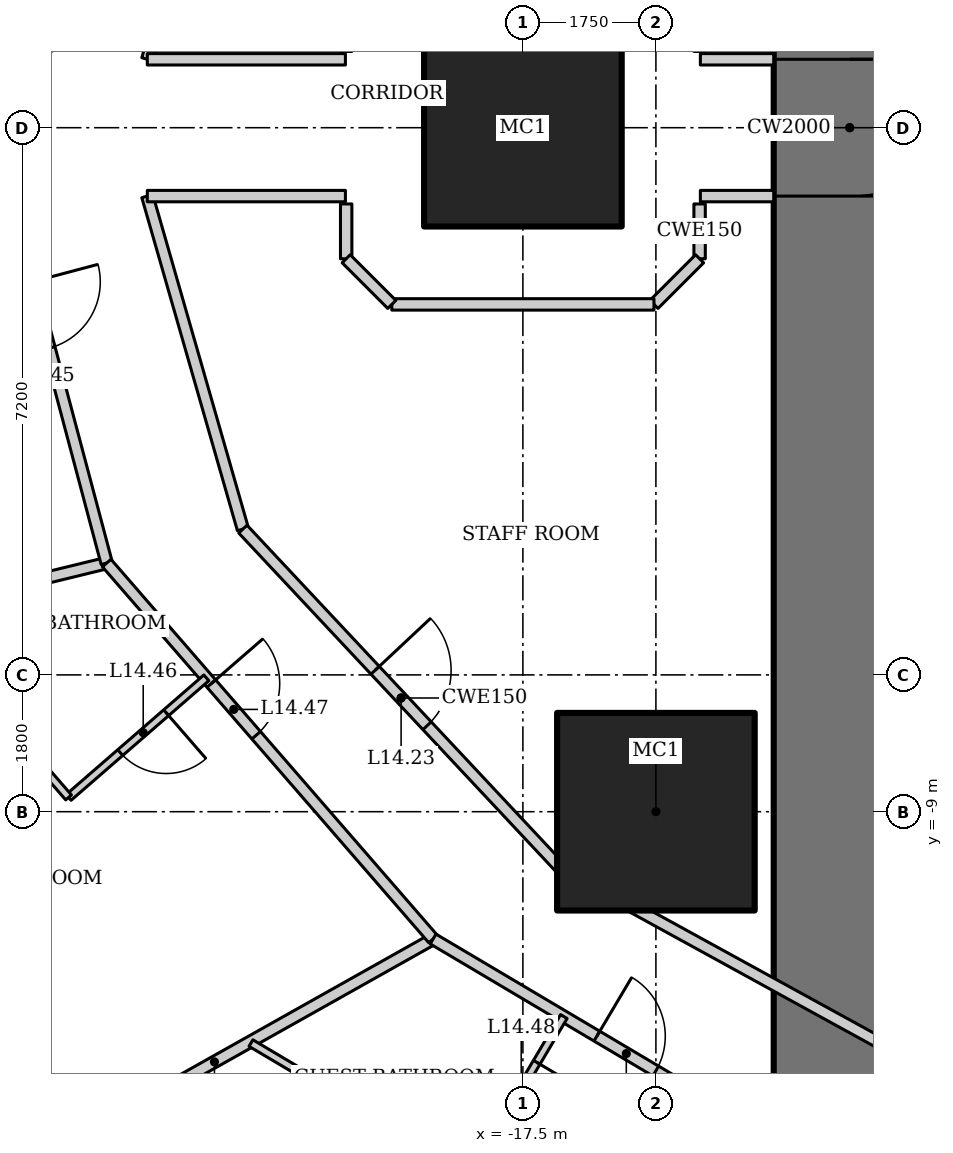
"""IFC4 building model, lengths in metres.
Left out: names, types, materials, properties, quantities, classifications, styles, units other than length and angle.
Written with IfcOpenShell. Run it as: python <this file> out.ifc"""

import sys

from ifc_helpers import new_model, si_unit, direction, frame, frame_2d, origin, origin_2d, place, context, subcontext, project, spatial, rectangle, hollow_rectangle, extrude, element, fill, save


model = new_model("IFC4")
c1 = context("Model", 3, precision=1e-05, world=origin(), true_north=direction((0.0, 1.0)))
c2 = subcontext(c1, "Body", "Model", "MODEL_VIEW")
j1 = project(units=[si_unit("LENGTHUNIT", "METRE"), si_unit("PLANEANGLEUNIT", "RADIAN")], contexts=[c1])
p1 = place(None, origin())
s1 = spatial("IfcSite", under=j1, at=p1, CompositionType="ELEMENT")
p2 = place(p1, origin())
s2 = spatial("IfcBuilding", under=s1, at=p2, CompositionType="ELEMENT")
p3 = place(p2, frame((0.0, 0.0, 65.8)))
s3 = spatial("IfcBuildingStorey", under=s2, at=p3, CompositionType="ELEMENT", Elevation=65.8)
for number, where, z_axis, x_axis in (
    (1, (-17.5, 0.0, 0.0), (0.0, 0.0, 1.0), (1.0, 0.0, 0.0)),
    (2, (-15.75, -9.0, 0.0), (0.0, 0.0, 1.0), (1.0, 0.0, 0.0)),
):
    element("IfcColumn", number, at=place(p3, frame(where, z_axis=z_axis, x_axis=x_axis)), inside=s3, PredefinedType="COLUMN", context=c2, shape_type="SweptSolid", body=[
        extrude(hollow_rectangle(XDim=2.6, YDim=2.6, WallThickness=0.13, at=origin_2d()), origin(), (0.0, 0.0, 1.0), 3.6),
    ])
p4 = place(p3, frame((-13.2, 13.0, 0.0), z_axis=(0.0, 0.0, 1.0), x_axis=(0.0, -1.0, 0.0)))
e3 = element("IfcWall", 3, at=p4, inside=s3, PredefinedType="SHEAR", context=c2, shape_type="SweptSolid", body=[
    extrude(rectangle(XDim=26.0, YDim=2.0, at=frame_2d((13.0, 0.0))), origin(), (0.0, 0.0, 1.0), 3.6),
])
p5 = place(p4, frame((12.1, 0.0, 0.0)))
e4 = element("IfcOpeningElement", 4, at=p5, cuts=e3, PredefinedType="OPENING", context=c2, shape_type="SweptSolid", body=[
    extrude(rectangle(XDim=1.8, YDim=2.1, at=frame_2d((0.9, 1.05))), frame((0.0, 1.01, 0.0), z_axis=(0.0, -1.0, 0.0), x_axis=(1.0, 0.0, 0.0)), (0.0, 0.0, 1.0), 2.02),
])
p6 = place(p3, frame((-29.222, -7.254, 0.0), z_axis=(0.0, 0.0, 1.0), x_axis=(0.971456980633, 0.237215797913, 0.0)))
e5 = element("IfcWall", 5, at=p6, inside=s3, PredefinedType="PARTITIONING", context=c2, shape_type="SweptSolid", body=[
    extrude(rectangle(XDim=6.429, YDim=0.15, at=frame_2d((3.215, 0.0))), origin(), (0.0, 0.0, 1.0), 2.332),
])
p7 = place(p3, frame((-24.435, -13.909, 0.0), z_axis=(0.0, 0.0, 1.0), x_axis=(0.871747379892, 0.489955616001, 0.0)))
e6 = element("IfcWall", 6, at=p7, inside=s3, PredefinedType="PARTITIONING", context=c2, shape_type="SweptSolid", body=[
    extrude(rectangle(XDim=6.6, YDim=0.15, at=frame_2d((3.3, 0.0))), origin(), (0.0, 0.0, 1.0), 2.693),
])
p8 = place(p3, frame((-22.976, 5.729, 0.0), z_axis=(0.0, 0.0, 1.0), x_axis=(-0.257083265334, -0.966389256296, 0.0)))
e7 = element("IfcWall", 7, at=p8, inside=s3, PredefinedType="PARTITIONING", context=c2, shape_type="SweptSolid", body=[
    extrude(rectangle(XDim=5.928, YDim=0.15, at=frame_2d((2.964, 0.0))), origin(), (0.0, 0.0, 1.0), 3.45),
])
p9 = place(p8, frame((4.023, 0.0, 0.0)))
e8 = element("IfcOpeningElement", 8, at=p9, cuts=e7, PredefinedType="OPENING", context=c2, shape_type="SweptSolid", body=[
    extrude(rectangle(XDim=0.9, YDim=2.1, at=frame_2d((0.45, 1.05))), frame((0.0, 0.085, 0.0), z_axis=(0.0, -1.0, 0.0), x_axis=(1.0, 0.0, 0.0)), (0.0, 0.0, 1.0), 0.17),
])
p10 = place(p3, frame((-24.5, 0.0, 0.0), z_axis=(0.0, 0.0, 1.0), x_axis=(0.257083265334, -0.966389256296, 0.0)))
e9 = element("IfcWall", 9, at=p10, inside=s3, PredefinedType="PARTITIONING", context=c2, shape_type="SweptSolid", body=[
    extrude(rectangle(XDim=5.928, YDim=0.15, at=frame_2d((2.964, 0.0))), origin(), (0.0, 0.0, 1.0), 3.45),
])
p11 = place(p10, frame((2.1, 0.0, 0.0)))
e10 = element("IfcOpeningElement", 10, at=p11, cuts=e9, PredefinedType="OPENING", context=c2, shape_type="SweptSolid", body=[
    extrude(rectangle(XDim=0.9, YDim=2.1, at=frame_2d((0.45, 1.05))), frame((0.0, 0.085, 0.0), z_axis=(0.0, -1.0, 0.0), x_axis=(1.0, 0.0, 0.0)), (0.0, 0.0, 1.0), 0.17),
])
p12 = place(p3, frame((-22.976, -5.729, 0.0), z_axis=(0.0, 0.0, 1.0), x_axis=(0.655599989166, -0.755108372491, 0.0)))
e11 = element("IfcWall", 11, at=p12, inside=s3, PredefinedType="PARTITIONING", context=c2, shape_type="SweptSolid", body=[
    extrude(rectangle(XDim=6.551, YDim=0.15, at=frame_2d((3.275, 0.0))), origin(), (0.0, 0.0, 1.0), 3.45),
])
p13 = place(p12, frame((2.1, 0.0, 0.0)))
e12 = element("IfcOpeningElement", 12, at=p13, cuts=e11, PredefinedType="OPENING", context=c2, shape_type="SweptSolid", body=[
    extrude(rectangle(XDim=0.9, YDim=2.1, at=frame_2d((0.45, 1.05))), frame((0.0, 0.085, 0.0), z_axis=(0.0, -1.0, 0.0), x_axis=(1.0, 0.0, 0.0)), (0.0, 0.0, 1.0), 0.17),
])
p14 = place(p3, frame((-18.681, -10.675, 0.0), z_axis=(0.0, 0.0, 1.0), x_axis=(0.860147339762, -0.510045639036, 0.0)))
e13 = element("IfcWall", 13, at=p14, inside=s3, PredefinedType="PARTITIONING", context=c2, shape_type="SweptSolid", body=[
    extrude(rectangle(XDim=6.19, YDim=0.15, at=frame_2d((3.095, 0.0))), origin(), (0.0, 0.0, 1.0), 3.45),
])
p15 = place(p14, frame((2.505, 0.0, 0.0)))
e14 = element("IfcOpeningElement", 14, at=p15, cuts=e13, PredefinedType="OPENING", context=c2, shape_type="SweptSolid", body=[
    extrude(rectangle(XDim=0.9, YDim=2.1, at=frame_2d((0.45, 1.05))), frame((0.0, 0.085, 0.0), z_axis=(0.0, -1.0, 0.0), x_axis=(1.0, 0.0, 0.0)), (0.0, 0.0, 1.0), 0.17),
])
for number, where, z_axis, x_axis in (
    (15, (-21.184, 5.282, 0.0), (0.0, 0.0, 1.0), (-0.276, -0.961, 0.0)),
    (16, (-22.442, -0.9, 0.0), (0.0, 0.0, 1.0), (0.276, -0.961, 0.0)),
):
    element("IfcWall", number, at=place(p3, frame(where, z_axis=z_axis, x_axis=x_axis)), inside=s3, PredefinedType="PARTITIONING", context=c2, shape_type="SweptSolid", body=[
        extrude(rectangle(XDim=4.559, YDim=0.15, at=frame_2d((2.279, 0.0))), origin(), (0.0, 0.0, 1.0), 3.45),
    ])
p16 = place(p3, frame((-21.184, -5.282, 0.0), z_axis=(0.0, 0.0, 1.0), x_axis=(0.68365836236, -0.729802194828, 0.0)))
e17 = element("IfcWall", 17, at=p16, inside=s3, PredefinedType="PARTITIONING", context=c2, shape_type="SweptSolid", body=[
    extrude(rectangle(XDim=6.09, YDim=0.15, at=frame_2d((3.045, 0.0))), origin(), (0.0, 0.0, 1.0), 3.45),
])
p17 = place(p16, frame((2.545, 0.0, 0.0)))
e18 = element("IfcOpeningElement", 18, at=p17, cuts=e17, PredefinedType="OPENING", context=c2, shape_type="SweptSolid", body=[
    extrude(rectangle(XDim=1.0, YDim=2.1, at=frame_2d((0.5, 1.05))), frame((0.0, 0.085, 0.0), z_axis=(0.0, -1.0, 0.0), x_axis=(1.0, 0.0, 0.0)), (0.0, 0.0, 1.0), 0.17),
])
p18 = place(p3, frame((-17.021, -9.726, 0.0), z_axis=(0.0, 0.0, 1.0), x_axis=(0.876522084062, -0.481361647986, 0.0)))
e19 = element("IfcWall", 19, at=p18, inside=s3, PredefinedType="PARTITIONING", context=c2, shape_type="SweptSolid", body=[
    extrude(rectangle(XDim=5.687, YDim=0.15, at=frame_2d((2.844, 0.0))), origin(), (0.0, 0.0, 1.0), 3.45),
])
p19 = place(p3, frame((-21.665, -7.239, 0.0), z_axis=(0.0, 0.0, 1.0), x_axis=(-0.755098052661, -0.655611875172, 0.0)))
e20 = element("IfcWall", 20, at=p19, inside=s3, PredefinedType="PARTITIONING", context=c2, shape_type="SweptSolid", body=[
    extrude(rectangle(XDim=2.4, YDim=0.1, at=frame_2d((1.2, 0.0))), origin(), (0.0, 0.0, 1.0), 3.45),
])
p20 = place(p19, frame((0.7, 0.0, 0.0)))
e21 = element("IfcOpeningElement", 21, at=p20, cuts=e20, PredefinedType="OPENING", context=c2, shape_type="SweptSolid", body=[
    extrude(rectangle(XDim=0.8, YDim=2.1, at=frame_2d((0.4, 1.05))), frame((0.0, 0.06, 0.0), z_axis=(0.0, -1.0, 0.0), x_axis=(1.0, 0.0, 0.0)), (0.0, 0.0, 1.0), 0.12),
])
p21 = place(p3, frame((-23.477, -8.812, 0.0), z_axis=(0.0, 0.0, 1.0), x_axis=(-0.655596826012, 0.755111118792, 0.0)))
e22 = element("IfcWall", 22, at=p21, inside=s3, PredefinedType="PARTITIONING", context=c2, shape_type="SweptSolid", body=[
    extrude(rectangle(XDim=3.221, YDim=0.1, at=frame_2d((1.611, 0.0))), origin(), (0.0, 0.0, 1.0), 3.45),
])
p22 = place(p3, frame((-16.961, -11.695, 0.0), z_axis=(0.0, 0.0, 1.0), x_axis=(-0.510075642074, -0.860129548012, 0.0)))
e23 = element("IfcWall", 23, at=p22, inside=s3, PredefinedType="PARTITIONING", context=c2, shape_type="SweptSolid", body=[
    extrude(rectangle(XDim=2.4, YDim=0.1, at=frame_2d((1.2, 0.0))), origin(), (0.0, 0.0, 1.0), 3.45),
])
p23 = place(p22, frame((0.7, 0.0, 0.0)))
e24 = element("IfcOpeningElement", 24, at=p23, cuts=e23, PredefinedType="OPENING", context=c2, shape_type="SweptSolid", body=[
    extrude(rectangle(XDim=0.8, YDim=2.1, at=frame_2d((0.4, 1.05))), frame((0.0, 0.06, 0.0), z_axis=(0.0, -1.0, 0.0), x_axis=(1.0, 0.0, 0.0)), (0.0, 0.0, 1.0), 0.12),
])
p24 = place(p3, frame((-18.185, -13.76, 0.0), z_axis=(0.0, 0.0, 1.0), x_axis=(-0.860146437071, 0.510047161343, 0.0)))
e25 = element("IfcWall", 25, at=p24, inside=s3, PredefinedType="PARTITIONING", context=c2, shape_type="SweptSolid", body=[
    extrude(rectangle(XDim=3.363, YDim=0.1, at=frame_2d((1.681, 0.0))), origin(), (0.0, 0.0, 1.0), 3.45),
])
p25 = place(p3, frame((-14.2, -0.9, 0.0), z_axis=(0.0, 0.0, 1.0), x_axis=(-1.0, 0.0, 0.0)))
e26 = element("IfcWall", 26, at=p25, inside=s3, PredefinedType="PARTITIONING", context=c2, shape_type="SweptSolid", body=[
    extrude(rectangle(XDim=0.965, YDim=0.15, at=frame_2d((0.482, 0.0))), origin(), (0.0, 0.0, 1.0), 3.45),
])
p26 = place(p3, frame((-19.835, -0.9, 0.0), z_axis=(0.0, 0.0, 1.0), x_axis=(-1.0, 0.0, 0.0)))
e27 = element("IfcWall", 27, at=p26, inside=s3, PredefinedType="PARTITIONING", context=c2, shape_type="SweptSolid", body=[
    extrude(rectangle(XDim=2.607, YDim=0.15, at=frame_2d((1.303, 0.0))), origin(), (0.0, 0.0, 1.0), 3.45),
])
p27 = place(p3, frame((-14.2, 0.9, 0.0), z_axis=(0.0, 0.0, 1.0), x_axis=(-1.0, 0.0, 0.0)))
e28 = element("IfcWall", 28, at=p27, inside=s3, PredefinedType="PARTITIONING", context=c2, shape_type="SweptSolid", body=[
    extrude(rectangle(XDim=0.965, YDim=0.15, at=frame_2d((0.482, 0.0))), origin(), (0.0, 0.0, 1.0), 3.45),
])
p28 = place(p3, frame((-19.835, 0.9, 0.0), z_axis=(0.0, 0.0, 1.0), x_axis=(-1.0, 0.0, 0.0)))
e29 = element("IfcWall", 29, at=p28, inside=s3, PredefinedType="PARTITIONING", context=c2, shape_type="SweptSolid", body=[
    extrude(rectangle(XDim=2.607, YDim=0.15, at=frame_2d((1.303, 0.0))), origin(), (0.0, 0.0, 1.0), 3.45),
])
for number, where, z_axis, x_axis in (
    (30, (-19.825, -1.725, 0.0), (0.0, 0.0, 1.0), (0.0, 1.0, 0.0)),
    (31, (-15.175, -1.003, 0.0), (0.0, 0.0, 1.0), (0.0, -1.0, 0.0)),
):
    element("IfcWall", number, at=place(p3, frame(where, z_axis=z_axis, x_axis=x_axis)), inside=s3, PredefinedType="PARTITIONING", context=c2, shape_type="SweptSolid", body=[
        extrude(rectangle(XDim=0.721, YDim=0.15, at=frame_2d((0.361, 0.0))), origin(), (0.0, 0.0, 1.0), 3.45),
    ])
p29 = place(p3, frame((-15.175, -1.725, 0.0), z_axis=(0.0, 0.0, 1.0), x_axis=(-0.707106781187, -0.707106781187, 0.0)))
e32 = element("IfcWall", 32, at=p29, inside=s3, PredefinedType="PARTITIONING", context=c2, shape_type="SweptSolid", body=[
    extrude(rectangle(XDim=0.849, YDim=0.15, at=frame_2d((0.425, 0.0))), origin(), (0.0, 0.0, 1.0), 3.45),
])
p30 = place(p3, frame((-15.775, -2.325, 0.0), z_axis=(0.0, 0.0, 1.0), x_axis=(-1.0, 0.0, 0.0)))
e33 = element("IfcWall", 33, at=p30, inside=s3, PredefinedType="PARTITIONING", context=c2, shape_type="SweptSolid", body=[
    extrude(rectangle(XDim=3.449, YDim=0.15, at=frame_2d((1.725, 0.0))), origin(), (0.0, 0.0, 1.0), 3.45),
])
p31 = place(p3, frame((-19.225, -2.325, 0.0), z_axis=(0.0, 0.0, 1.0), x_axis=(-0.707106781187, 0.707106781187, 0.0)))
e34 = element("IfcWall", 34, at=p31, inside=s3, PredefinedType="PARTITIONING", context=c2, shape_type="SweptSolid", body=[
    extrude(rectangle(XDim=0.849, YDim=0.15, at=frame_2d((0.425, 0.0))), origin(), (0.0, 0.0, 1.0), 3.45),
])
p32 = place(p5, origin())
e35 = element("IfcDoor", 35, at=p32, inside=s3, OperationType="DOUBLE_DOOR_DOUBLE_SWING", PredefinedType="DOOR", context=c2, shape_type="SweptSolid", body=[
    extrude(rectangle(XDim=1.8, YDim=2.1, at=frame_2d((0.9, 1.05))), frame((0.0, 0.025, 0.0), z_axis=(0.0, -1.0, 0.0), x_axis=(1.0, 0.0, 0.0)), (0.0, 0.0, 1.0), 0.05),
])
fill(e4, e35)
p33 = place(p17, origin())
e36 = element("IfcDoor", 36, at=p33, inside=s3, OperationType="SINGLE_SWING_LEFT", PredefinedType="DOOR", context=c2, shape_type="SweptSolid", body=[
    extrude(rectangle(XDim=1.0, YDim=2.1, at=frame_2d((0.5, 1.05))), frame((0.0, 0.025, 0.0), z_axis=(0.0, -1.0, 0.0), x_axis=(1.0, 0.0, 0.0)), (0.0, 0.0, 1.0), 0.05),
])
fill(e18, e36)
p34 = place(p20, origin())
e37 = element("IfcDoor", 37, at=p34, inside=s3, OperationType="SINGLE_SWING_LEFT", PredefinedType="DOOR", context=c2, shape_type="SweptSolid", body=[
    extrude(rectangle(XDim=0.8, YDim=2.1, at=frame_2d((0.4, 1.05))), frame((0.0, 0.025, 0.0), z_axis=(0.0, -1.0, 0.0), x_axis=(1.0, 0.0, 0.0)), (0.0, 0.0, 1.0), 0.05),
])
fill(e21, e37)
p35 = place(p13, origin())
e38 = element("IfcDoor", 38, at=p35, inside=s3, OperationType="SINGLE_SWING_LEFT", PredefinedType="DOOR", context=c2, shape_type="SweptSolid", body=[
    extrude(rectangle(XDim=0.9, YDim=2.1, at=frame_2d((0.45, 1.05))), frame((0.0, 0.025, 0.0), z_axis=(0.0, -1.0, 0.0), x_axis=(1.0, 0.0, 0.0)), (0.0, 0.0, 1.0), 0.05),
])
fill(e12, e38)
p36 = place(p23, origin())
e39 = element("IfcDoor", 39, at=p36, inside=s3, OperationType="SINGLE_SWING_LEFT", PredefinedType="DOOR", context=c2, shape_type="SweptSolid", body=[
    extrude(rectangle(XDim=0.8, YDim=2.1, at=frame_2d((0.4, 1.05))), frame((0.0, 0.025, 0.0), z_axis=(0.0, -1.0, 0.0), x_axis=(1.0, 0.0, 0.0)), (0.0, 0.0, 1.0), 0.05),
])
fill(e24, e39)
p37 = place(p15, origin())
e40 = element("IfcDoor", 40, at=p37, inside=s3, OperationType="SINGLE_SWING_LEFT", PredefinedType="DOOR", context=c2, shape_type="SweptSolid", body=[
    extrude(rectangle(XDim=0.9, YDim=2.1, at=frame_2d((0.45, 1.05))), frame((0.0, 0.025, 0.0), z_axis=(0.0, -1.0, 0.0), x_axis=(1.0, 0.0, 0.0)), (0.0, 0.0, 1.0), 0.05),
])
fill(e14, e40)
save(model, sys.argv[1])
